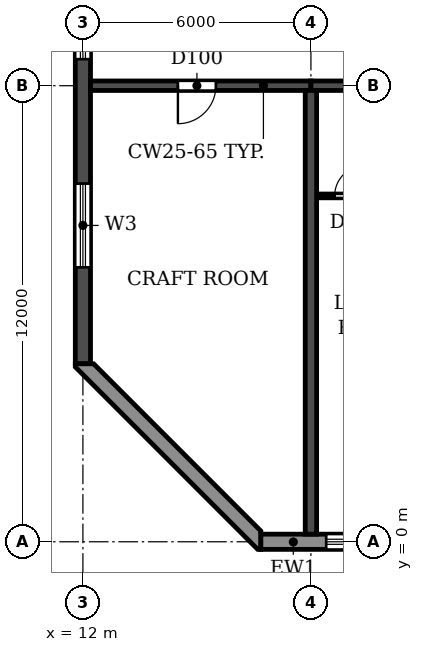
"""IFC4 building model, lengths in metres.
Left out: names, types, materials, properties, quantities, classifications, styles, units other than length and angle.
Written with IfcOpenShell. Run it as: python <this file> out.ifc"""

import sys

from ifc_helpers import new_model, si_unit, direction, frame, frame_2d, origin, place, context, subcontext, project, spatial, polyline, rectangle, outline, extrude, element, fill, save


model = new_model("IFC4")
c1 = context("Model", 3, precision=1e-05, world=origin(), true_north=direction((0.0, 1.0)))
c2 = subcontext(c1, "Body", "Model", "MODEL_VIEW")
j1 = project(units=[si_unit("LENGTHUNIT", "METRE"), si_unit("PLANEANGLEUNIT", "RADIAN")], contexts=[c1])
p1 = place(None, origin())
s1 = spatial("IfcSite", under=j1, at=p1, CompositionType="ELEMENT")
p2 = place(p1, origin())
s2 = spatial("IfcBuilding", under=s1, at=p2, CompositionType="ELEMENT")
p3 = place(p2, frame((0.0, 0.0, 142.2)))
s3 = spatial("IfcBuildingStorey", under=s2, at=p3, CompositionType="ELEMENT", Elevation=142.2)
p4 = place(p3, frame((18.0, 0.2, 0.0), z_axis=(0.0, 0.0, 1.0), x_axis=(0.0, 1.0, 0.0)))
e1 = element("IfcWall", 1, at=p4, inside=s3, PredefinedType="SHEAR", context=c2, shape_type="SweptSolid", body=[
    extrude(rectangle(XDim=11.675, YDim=0.3, at=frame_2d((5.837, 0.0))), origin(), (0.0, 0.0, 1.0), 3.07),
])
p5 = place(p3, frame((12.0, 4.683, 0.0), z_axis=(0.0, 0.0, 1.0), x_axis=(0.0, 1.0, 0.0)))
e2 = element("IfcWall", 2, at=p5, inside=s3, PredefinedType="SHEAR", context=c2, shape_type="SweptSolid", body=[
    extrude(rectangle(XDim=33.034, YDim=0.4, at=frame_2d((16.517, 0.0))), origin(), (0.0, 0.0, 1.0), 3.07),
])
p6 = place(p5, frame((23.817, 0.0, 0.9)))
e3 = element("IfcOpeningElement", 3, at=p6, cuts=e2, PredefinedType="OPENING", context=c2, shape_type="SweptSolid", body=[
    extrude(rectangle(XDim=1.2, YDim=1.5, at=frame_2d((0.6, 0.75))), frame((0.0, 0.21, 0.0), z_axis=(0.0, -1.0, 0.0), x_axis=(1.0, 0.0, 0.0)), (0.0, 0.0, 1.0), 0.42),
])
p7 = place(p5, frame((8.017, 0.0, 0.9)))
e4 = element("IfcOpeningElement", 4, at=p7, cuts=e2, PredefinedType="OPENING", context=c2, shape_type="SweptSolid", body=[
    extrude(rectangle(XDim=1.2, YDim=1.5, at=frame_2d((0.6, 0.75))), frame((0.0, 0.21, 0.0), z_axis=(0.0, -1.0, 0.0), x_axis=(1.0, 0.0, 0.0)), (0.0, 0.0, 1.0), 0.42),
])
p8 = place(p5, frame((28.293, 0.0, 0.6)))
e5 = element("IfcOpeningElement", 5, at=p8, cuts=e2, PredefinedType="OPENING", context=c2, shape_type="SweptSolid", body=[
    extrude(rectangle(XDim=2.2, YDim=1.8, at=frame_2d((1.1, 0.9))), frame((0.0, 0.21, 0.0), z_axis=(0.0, -1.0, 0.0), x_axis=(1.0, 0.0, 0.0)), (0.0, 0.0, 1.0), 0.42),
])
p9 = place(p5, frame((2.541, 0.0, 0.6)))
e6 = element("IfcOpeningElement", 6, at=p9, cuts=e2, PredefinedType="OPENING", context=c2, shape_type="SweptSolid", body=[
    extrude(rectangle(XDim=2.2, YDim=1.8, at=frame_2d((1.1, 0.9))), frame((0.0, 0.21, 0.0), z_axis=(0.0, -1.0, 0.0), x_axis=(1.0, 0.0, 0.0)), (0.0, 0.0, 1.0), 0.42),
])
p10 = place(p3, frame((12.2, 12.0, 0.0), z_axis=(0.0, 0.0, 1.0), x_axis=(1.0, 0.0, 0.0)))
e7 = element("IfcWall", 7, at=p10, inside=s3, PredefinedType="SHEAR", context=c2, shape_type="SweptSolid", body=[
    extrude(rectangle(XDim=5.8, YDim=0.25, at=frame_2d((2.9, 0.0))), origin(), (0.0, 0.0, 1.0), 2.47),
])
p11 = place(p10, frame((2.3, 0.0, 0.0)))
e8 = element("IfcOpeningElement", 8, at=p11, cuts=e7, PredefinedType="OPENING", context=c2, shape_type="SweptSolid", body=[
    extrude(rectangle(XDim=1.0, YDim=2.1, at=frame_2d((0.5, 1.05))), frame((0.0, 0.135, 0.0), z_axis=(0.0, -1.0, 0.0), x_axis=(1.0, 0.0, 0.0)), (0.0, 0.0, 1.0), 0.27),
])
p12 = place(p3, frame((18.0, 12.0, 0.0), z_axis=(0.0, 0.0, 1.0), x_axis=(1.0, 0.0, 0.0)))
e9 = element("IfcWall", 9, at=p12, inside=s3, PredefinedType="SHEAR", context=c2, shape_type="SweptSolid", body=[
    extrude(rectangle(XDim=6.0, YDim=0.25, at=frame_2d((3.0, 0.0))), origin(), (0.0, 0.0, 1.0), 2.47),
])
p13 = place(p12, frame((2.45, 0.0, 0.0)))
e10 = element("IfcOpeningElement", 10, at=p13, cuts=e9, PredefinedType="OPENING", context=c2, shape_type="SweptSolid", body=[
    extrude(rectangle(XDim=1.0, YDim=2.1, at=frame_2d((0.5, 1.05))), frame((0.0, 0.135, 0.0), z_axis=(0.0, -1.0, 0.0), x_axis=(1.0, 0.0, 0.0)), (0.0, 0.0, 1.0), 0.27),
])
p14 = place(p3, frame((16.683, 0.0, 0.0), z_axis=(0.0, 0.0, 1.0), x_axis=(1.0, 0.0, 0.0)))
e11 = element("IfcWall", 11, at=p14, inside=s3, PredefinedType="STANDARD", context=c2, shape_type="SweptSolid", body=[
    extrude(rectangle(XDim=68.634, YDim=0.4, at=frame_2d((34.317, 0.0))), origin(), (0.0, 0.0, 1.0), 3.07),
])
p15 = place(p14, frame((1.717, 0.0, 0.9)))
e12 = element("IfcOpeningElement", 12, at=p15, cuts=e11, PredefinedType="OPENING", context=c2, shape_type="SweptSolid", body=[
    extrude(rectangle(XDim=2.2, YDim=1.5, at=frame_2d((1.1, 0.75))), frame((0.0, 0.21, 0.0), z_axis=(0.0, -1.0, 0.0), x_axis=(1.0, 0.0, 0.0)), (0.0, 0.0, 1.0), 0.42),
])
p16 = place(p14, frame((4.717, 0.0, 0.9)))
e13 = element("IfcOpeningElement", 13, at=p16, cuts=e11, PredefinedType="OPENING", context=c2, shape_type="SweptSolid", body=[
    extrude(rectangle(XDim=2.2, YDim=1.5, at=frame_2d((1.1, 0.75))), frame((0.0, 0.21, 0.0), z_axis=(0.0, -1.0, 0.0), x_axis=(1.0, 0.0, 0.0)), (0.0, 0.0, 1.0), 0.42),
])
p17 = place(p14, frame((7.717, 0.0, 0.9)))
e14 = element("IfcOpeningElement", 14, at=p17, cuts=e11, PredefinedType="OPENING", context=c2, shape_type="SweptSolid", body=[
    extrude(rectangle(XDim=2.2, YDim=1.5, at=frame_2d((1.1, 0.75))), frame((0.0, 0.21, 0.0), z_axis=(0.0, -1.0, 0.0), x_axis=(1.0, 0.0, 0.0)), (0.0, 0.0, 1.0), 0.42),
])
p18 = place(p14, frame((10.717, 0.0, 0.9)))
e15 = element("IfcOpeningElement", 15, at=p18, cuts=e11, PredefinedType="OPENING", context=c2, shape_type="SweptSolid", body=[
    extrude(rectangle(XDim=2.2, YDim=1.5, at=frame_2d((1.1, 0.75))), frame((0.0, 0.21, 0.0), z_axis=(0.0, -1.0, 0.0), x_axis=(1.0, 0.0, 0.0)), (0.0, 0.0, 1.0), 0.42),
])
p19 = place(p14, frame((13.717, 0.0, 0.9)))
e16 = element("IfcOpeningElement", 16, at=p19, cuts=e11, PredefinedType="OPENING", context=c2, shape_type="SweptSolid", body=[
    extrude(rectangle(XDim=2.2, YDim=1.5, at=frame_2d((1.1, 0.75))), frame((0.0, 0.21, 0.0), z_axis=(0.0, -1.0, 0.0), x_axis=(1.0, 0.0, 0.0)), (0.0, 0.0, 1.0), 0.42),
])
p20 = place(p14, frame((16.717, 0.0, 0.9)))
e17 = element("IfcOpeningElement", 17, at=p20, cuts=e11, PredefinedType="OPENING", context=c2, shape_type="SweptSolid", body=[
    extrude(rectangle(XDim=2.2, YDim=1.5, at=frame_2d((1.1, 0.75))), frame((0.0, 0.21, 0.0), z_axis=(0.0, -1.0, 0.0), x_axis=(1.0, 0.0, 0.0)), (0.0, 0.0, 1.0), 0.42),
])
p21 = place(p14, frame((19.717, 0.0, 0.9)))
e18 = element("IfcOpeningElement", 18, at=p21, cuts=e11, PredefinedType="OPENING", context=c2, shape_type="SweptSolid", body=[
    extrude(rectangle(XDim=2.2, YDim=1.5, at=frame_2d((1.1, 0.75))), frame((0.0, 0.21, 0.0), z_axis=(0.0, -1.0, 0.0), x_axis=(1.0, 0.0, 0.0)), (0.0, 0.0, 1.0), 0.42),
])
p22 = place(p14, frame((22.717, 0.0, 0.9)))
e19 = element("IfcOpeningElement", 19, at=p22, cuts=e11, PredefinedType="OPENING", context=c2, shape_type="SweptSolid", body=[
    extrude(rectangle(XDim=2.2, YDim=1.5, at=frame_2d((1.1, 0.75))), frame((0.0, 0.21, 0.0), z_axis=(0.0, -1.0, 0.0), x_axis=(1.0, 0.0, 0.0)), (0.0, 0.0, 1.0), 0.42),
])
p23 = place(p14, frame((25.717, 0.0, 0.9)))
e20 = element("IfcOpeningElement", 20, at=p23, cuts=e11, PredefinedType="OPENING", context=c2, shape_type="SweptSolid", body=[
    extrude(rectangle(XDim=2.2, YDim=1.5, at=frame_2d((1.1, 0.75))), frame((0.0, 0.21, 0.0), z_axis=(0.0, -1.0, 0.0), x_axis=(1.0, 0.0, 0.0)), (0.0, 0.0, 1.0), 0.42),
])
p24 = place(p14, frame((28.717, 0.0, 0.9)))
e21 = element("IfcOpeningElement", 21, at=p24, cuts=e11, PredefinedType="OPENING", context=c2, shape_type="SweptSolid", body=[
    extrude(rectangle(XDim=2.2, YDim=1.5, at=frame_2d((1.1, 0.75))), frame((0.0, 0.21, 0.0), z_axis=(0.0, -1.0, 0.0), x_axis=(1.0, 0.0, 0.0)), (0.0, 0.0, 1.0), 0.42),
])
p25 = place(p14, frame((31.717, 0.0, 0.9)))
e22 = element("IfcOpeningElement", 22, at=p25, cuts=e11, PredefinedType="OPENING", context=c2, shape_type="SweptSolid", body=[
    extrude(rectangle(XDim=2.2, YDim=1.5, at=frame_2d((1.1, 0.75))), frame((0.0, 0.21, 0.0), z_axis=(0.0, -1.0, 0.0), x_axis=(1.0, 0.0, 0.0)), (0.0, 0.0, 1.0), 0.42),
])
p26 = place(p14, frame((34.917, 0.0, 0.0)))
e23 = element("IfcOpeningElement", 23, at=p26, cuts=e11, PredefinedType="OPENING", context=c2, shape_type="SweptSolid", body=[
    extrude(rectangle(XDim=1.8, YDim=2.4, at=frame_2d((0.9, 1.2))), frame((0.0, 0.21, 0.0), z_axis=(0.0, -1.0, 0.0), x_axis=(1.0, 0.0, 0.0)), (0.0, 0.0, 1.0), 0.42),
])
p27 = place(p14, frame((37.717, 0.0, 0.9)))
e24 = element("IfcOpeningElement", 24, at=p27, cuts=e11, PredefinedType="OPENING", context=c2, shape_type="SweptSolid", body=[
    extrude(rectangle(XDim=2.2, YDim=1.5, at=frame_2d((1.1, 0.75))), frame((0.0, 0.21, 0.0), z_axis=(0.0, -1.0, 0.0), x_axis=(1.0, 0.0, 0.0)), (0.0, 0.0, 1.0), 0.42),
])
p28 = place(p14, frame((40.717, 0.0, 0.9)))
e25 = element("IfcOpeningElement", 25, at=p28, cuts=e11, PredefinedType="OPENING", context=c2, shape_type="SweptSolid", body=[
    extrude(rectangle(XDim=2.2, YDim=1.5, at=frame_2d((1.1, 0.75))), frame((0.0, 0.21, 0.0), z_axis=(0.0, -1.0, 0.0), x_axis=(1.0, 0.0, 0.0)), (0.0, 0.0, 1.0), 0.42),
])
p29 = place(p14, frame((43.717, 0.0, 0.9)))
e26 = element("IfcOpeningElement", 26, at=p29, cuts=e11, PredefinedType="OPENING", context=c2, shape_type="SweptSolid", body=[
    extrude(rectangle(XDim=2.2, YDim=1.5, at=frame_2d((1.1, 0.75))), frame((0.0, 0.21, 0.0), z_axis=(0.0, -1.0, 0.0), x_axis=(1.0, 0.0, 0.0)), (0.0, 0.0, 1.0), 0.42),
])
p30 = place(p14, frame((46.917, 0.0, 0.0)))
e27 = element("IfcOpeningElement", 27, at=p30, cuts=e11, PredefinedType="OPENING", context=c2, shape_type="SweptSolid", body=[
    extrude(rectangle(XDim=1.8, YDim=2.4, at=frame_2d((0.9, 1.2))), frame((0.0, 0.21, 0.0), z_axis=(0.0, -1.0, 0.0), x_axis=(1.0, 0.0, 0.0)), (0.0, 0.0, 1.0), 0.42),
])
p31 = place(p14, frame((49.717, 0.0, 0.9)))
e28 = element("IfcOpeningElement", 28, at=p31, cuts=e11, PredefinedType="OPENING", context=c2, shape_type="SweptSolid", body=[
    extrude(rectangle(XDim=2.2, YDim=1.5, at=frame_2d((1.1, 0.75))), frame((0.0, 0.21, 0.0), z_axis=(0.0, -1.0, 0.0), x_axis=(1.0, 0.0, 0.0)), (0.0, 0.0, 1.0), 0.42),
])
p32 = place(p14, frame((52.717, 0.0, 0.9)))
e29 = element("IfcOpeningElement", 29, at=p32, cuts=e11, PredefinedType="OPENING", context=c2, shape_type="SweptSolid", body=[
    extrude(rectangle(XDim=2.2, YDim=1.5, at=frame_2d((1.1, 0.75))), frame((0.0, 0.21, 0.0), z_axis=(0.0, -1.0, 0.0), x_axis=(1.0, 0.0, 0.0)), (0.0, 0.0, 1.0), 0.42),
])
p33 = place(p14, frame((55.717, 0.0, 0.9)))
e30 = element("IfcOpeningElement", 30, at=p33, cuts=e11, PredefinedType="OPENING", context=c2, shape_type="SweptSolid", body=[
    extrude(rectangle(XDim=2.2, YDim=1.5, at=frame_2d((1.1, 0.75))), frame((0.0, 0.21, 0.0), z_axis=(0.0, -1.0, 0.0), x_axis=(1.0, 0.0, 0.0)), (0.0, 0.0, 1.0), 0.42),
])
p34 = place(p14, frame((58.717, 0.0, 0.9)))
e31 = element("IfcOpeningElement", 31, at=p34, cuts=e11, PredefinedType="OPENING", context=c2, shape_type="SweptSolid", body=[
    extrude(rectangle(XDim=2.2, YDim=1.5, at=frame_2d((1.1, 0.75))), frame((0.0, 0.21, 0.0), z_axis=(0.0, -1.0, 0.0), x_axis=(1.0, 0.0, 0.0)), (0.0, 0.0, 1.0), 0.42),
])
p35 = place(p14, frame((61.717, 0.0, 0.9)))
e32 = element("IfcOpeningElement", 32, at=p35, cuts=e11, PredefinedType="OPENING", context=c2, shape_type="SweptSolid", body=[
    extrude(rectangle(XDim=2.2, YDim=1.5, at=frame_2d((1.1, 0.75))), frame((0.0, 0.21, 0.0), z_axis=(0.0, -1.0, 0.0), x_axis=(1.0, 0.0, 0.0)), (0.0, 0.0, 1.0), 0.42),
])
p36 = place(p14, frame((64.717, 0.0, 0.9)))
e33 = element("IfcOpeningElement", 33, at=p36, cuts=e11, PredefinedType="OPENING", context=c2, shape_type="SweptSolid", body=[
    extrude(rectangle(XDim=2.2, YDim=1.5, at=frame_2d((1.1, 0.75))), frame((0.0, 0.21, 0.0), z_axis=(0.0, -1.0, 0.0), x_axis=(1.0, 0.0, 0.0)), (0.0, 0.0, 1.0), 0.42),
])
p37 = place(p3, origin())
e34 = element("IfcWall", 34, at=p37, inside=s3, PredefinedType="STANDARD", context=c2, shape_type="SweptSolid", body=[
    extrude(outline(polyline([(11.8, 4.683), (11.8, 4.6), (16.6, -0.2), (16.683, -0.2), (16.683, 0.283), (12.283, 4.683), (11.8, 4.683)])), origin(), (0.0, 0.0, 1.0), 3.07),
])
p38 = place(p3, frame((18.16, 9.1, 0.0), z_axis=(0.0, 0.0, 1.0), x_axis=(1.0, 0.0, 0.0)))
e35 = element("IfcWall", 35, at=p38, inside=s3, PredefinedType="PARTITIONING", context=c2, shape_type="SweptSolid", body=[
    extrude(rectangle(XDim=1.94, YDim=0.1, at=frame_2d((0.97, 0.0))), origin(), (0.0, 0.0, 1.0), 3.07),
])
p39 = place(p38, frame((0.465, 0.0, 0.0)))
e36 = element("IfcOpeningElement", 36, at=p39, cuts=e35, PredefinedType="OPENING", context=c2, shape_type="SweptSolid", body=[
    extrude(rectangle(XDim=0.8, YDim=2.1, at=frame_2d((0.4, 1.05))), frame((0.0, 0.06, 0.0), z_axis=(0.0, -1.0, 0.0), x_axis=(1.0, 0.0, 0.0)), (0.0, 0.0, 1.0), 0.12),
])
p40 = place(p15, origin())
e37 = element("IfcWindow", 37, at=p40, inside=s3, PartitioningType="DOUBLE_PANEL_HORIZONTAL", PredefinedType="WINDOW", context=c2, shape_type="SweptSolid", body=[
    extrude(rectangle(XDim=2.2, YDim=1.5, at=frame_2d((1.1, 0.75))), frame((0.0, 0.03, 0.0), z_axis=(0.0, -1.0, 0.0), x_axis=(1.0, 0.0, 0.0)), (0.0, 0.0, 1.0), 0.06),
])
fill(e12, e37)
p41 = place(p7, origin())
e38 = element("IfcWindow", 38, at=p41, inside=s3, PartitioningType="SINGLE_PANEL", PredefinedType="WINDOW", context=c2, shape_type="SweptSolid", body=[
    extrude(rectangle(XDim=1.2, YDim=1.5, at=frame_2d((0.6, 0.75))), frame((0.0, 0.03, 0.0), z_axis=(0.0, -1.0, 0.0), x_axis=(1.0, 0.0, 0.0)), (0.0, 0.0, 1.0), 0.06),
])
fill(e4, e38)
p42 = place(p9, origin())
e39 = element("IfcWindow", 39, at=p42, inside=s3, PartitioningType="DOUBLE_PANEL_HORIZONTAL", PredefinedType="WINDOW", context=c2, shape_type="SweptSolid", body=[
    extrude(rectangle(XDim=2.2, YDim=1.8, at=frame_2d((1.1, 0.9))), frame((0.0, 0.03, 0.0), z_axis=(0.0, -1.0, 0.0), x_axis=(1.0, 0.0, 0.0)), (0.0, 0.0, 1.0), 0.06),
])
fill(e6, e39)
p43 = place(p11, frame((1.0, 0.0, 0.0), z_axis=(0.0, 0.0, 1.0), x_axis=(-1.0, 0.0, 0.0)))
e40 = element("IfcDoor", 40, at=p43, inside=s3, OperationType="SINGLE_SWING_RIGHT", PredefinedType="DOOR", context=c2, shape_type="SweptSolid", body=[
    extrude(rectangle(XDim=1.0, YDim=2.1, at=frame_2d((0.5, 1.05))), frame((0.0, 0.025, 0.0), z_axis=(0.0, -1.0, 0.0), x_axis=(1.0, 0.0, 0.0)), (0.0, 0.0, 1.0), 0.05),
])
fill(e8, e40)
p44 = place(p39, origin())
e41 = element("IfcDoor", 41, at=p44, inside=s3, OperationType="SINGLE_SWING_RIGHT", PredefinedType="DOOR", context=c2, shape_type="SweptSolid", body=[
    extrude(rectangle(XDim=0.8, YDim=2.1, at=frame_2d((0.4, 1.05))), frame((0.0, 0.025, 0.0), z_axis=(0.0, -1.0, 0.0), x_axis=(1.0, 0.0, 0.0)), (0.0, 0.0, 1.0), 0.05),
])
fill(e36, e41)
save(model, sys.argv[1])
